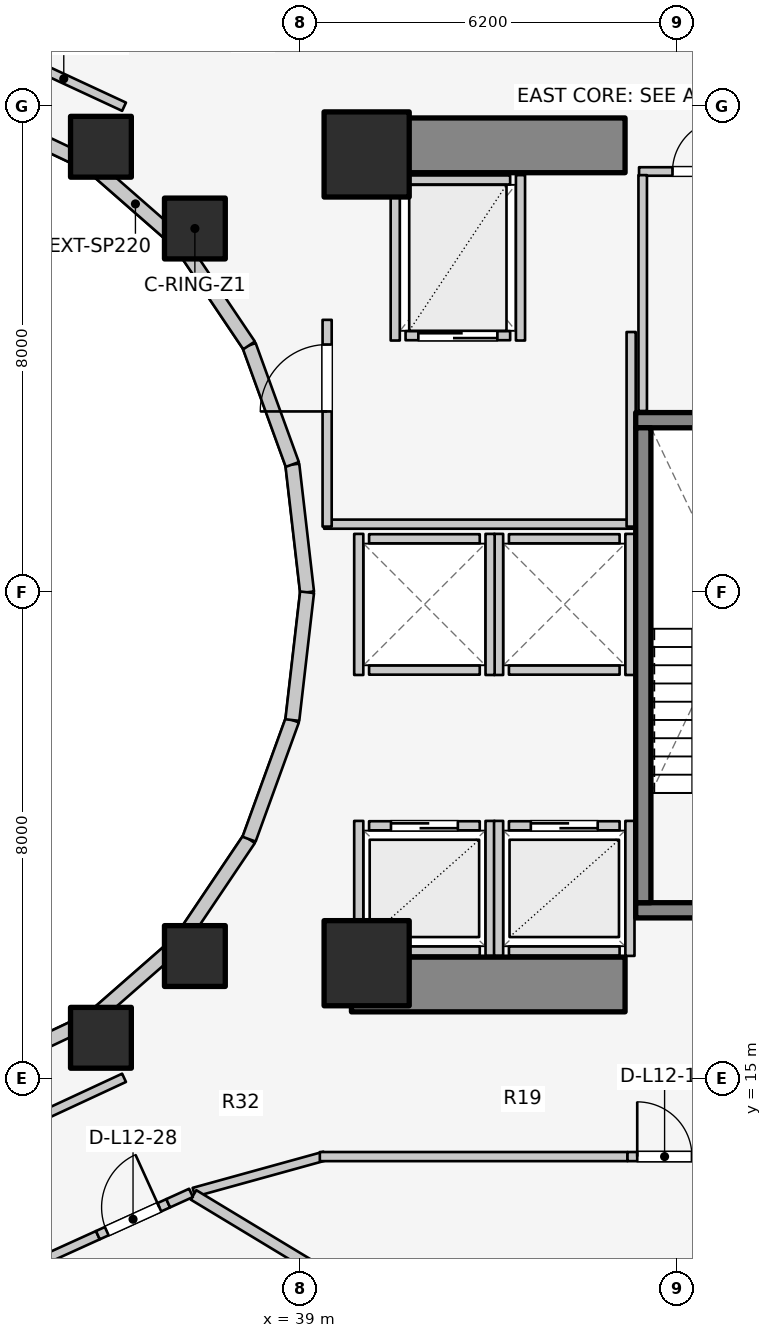
"""IFC4 building model, lengths in metres.
Left out: names, types, materials, properties, quantities, classifications, styles, units other than length and angle.
Written with IfcOpenShell. Run it as: python <this file> out.ifc"""

import sys

from ifc_helpers import new_model, si_unit, direction, frame, frame_2d, origin, origin_2d, place, context, subcontext, project, spatial, rectangle, extrude, element, fill, save


model = new_model("IFC4")
c1 = context("Model", 3, precision=1e-05, world=origin(), true_north=direction((0.0, 1.0)))
c2 = subcontext(c1, "Body", "Model", "MODEL_VIEW")
j1 = project(units=[si_unit("LENGTHUNIT", "METRE"), si_unit("PLANEANGLEUNIT", "RADIAN")], contexts=[c1])
p1 = place(None, origin())
s1 = spatial("IfcSite", under=j1, at=p1, CompositionType="ELEMENT")
p2 = place(p1, origin())
s2 = spatial("IfcBuilding", under=s1, at=p2, CompositionType="ELEMENT")
p3 = place(p2, frame((0.0, 0.0, 43.1)))
s3 = spatial("IfcBuildingStorey", under=s2, at=p3, CompositionType="ELEMENT", Elevation=43.1)
for number, where, z_axis, x_axis in (
    (1, (39.85, 16.55, 0.0), (0.0, 0.0, 1.0), (1.0, 0.0, 0.0)),
    (2, (39.85, 30.35, 0.0), (0.0, 0.0, 1.0), (1.0, 0.0, 0.0)),
):
    element("IfcWall", number, at=place(p3, frame(where, z_axis=z_axis, x_axis=x_axis)), inside=s3, PredefinedType="SHEAR", context=c2, shape_type="SweptSolid", body=[
        extrude(rectangle(XDim=4.5, YDim=0.9, at=frame_2d((2.25, 0.0))), origin(), (0.0, 0.0, 1.0), 3.1),
    ])
p4 = place(p3, frame((44.525, 17.77, 0.0), z_axis=(0.0, 0.0, 1.0), x_axis=(1.0, 0.0, 0.0)))
e3 = element("IfcWall", 3, at=p4, inside=s3, PredefinedType="SOLIDWALL", context=c2, shape_type="SweptSolid", body=[
    extrude(rectangle(XDim=3.37, YDim=0.25, at=frame_2d((1.685, 0.0))), origin(), (0.0, 0.0, 1.0), 3.1),
])
p5 = place(p4, frame((1.135, 0.0, 0.0)))
e4 = element("IfcOpeningElement", 4, at=p5, cuts=e3, PredefinedType="OPENING", context=c2, shape_type="SweptSolid", body=[
    extrude(rectangle(XDim=1.1, YDim=2.1, at=frame_2d((0.55, 1.05))), frame((0.0, 0.135, 0.0), z_axis=(0.0, -1.0, 0.0), x_axis=(1.0, 0.0, 0.0)), (0.0, 0.0, 1.0), 0.27),
])
p6 = place(p3, frame((44.525, 25.83, 0.0), z_axis=(0.0, 0.0, 1.0), x_axis=(1.0, 0.0, 0.0)))
e5 = element("IfcWall", 5, at=p6, inside=s3, PredefinedType="SOLIDWALL", context=c2, shape_type="SweptSolid", body=[
    extrude(rectangle(XDim=3.37, YDim=0.25, at=frame_2d((1.685, 0.0))), origin(), (0.0, 0.0, 1.0), 3.1),
])
p7 = place(p3, frame((44.65, 17.895, 0.0), z_axis=(0.0, 0.0, 1.0), x_axis=(0.0, 1.0, 0.0)))
e6 = element("IfcWall", 6, at=p7, inside=s3, PredefinedType="SOLIDWALL", context=c2, shape_type="SweptSolid", body=[
    extrude(rectangle(XDim=7.81, YDim=0.25, at=frame_2d((3.905, 0.0))), origin(), (0.0, 0.0, 1.0), 3.1),
])
for number, where, z_axis, x_axis in (
    (7, (40.1, 16.9, 0.0), (0.0, 0.0, 1.0), (1.0, 0.0, 0.0)),
    (8, (40.1, 30.2, 0.0), (0.0, 0.0, 1.0), (1.0, 0.0, 0.0)),
):
    element("IfcColumn", number, at=place(p3, frame(where, z_axis=z_axis, x_axis=x_axis)), inside=s3, PredefinedType="COLUMN", context=c2, shape_type="SweptSolid", body=[
        extrude(rectangle(XDim=1.4, YDim=1.4, at=origin_2d()), origin(), (0.0, 0.0, 1.0), 3.1),
    ])
for number, where, z_axis, x_axis in (
    (9, (37.275, 28.982, 0.0), (0.0, 0.0, 1.0), (1.0, 0.0, 0.0)),
    (10, (35.73, 30.327, 0.0), (0.0, 0.0, 1.0), (1.0, 0.0, 0.0)),
    (11, (35.73, 15.673, 0.0), (0.0, 0.0, 1.0), (1.0, 0.0, 0.0)),
    (12, (37.275, 17.018, 0.0), (0.0, 0.0, 1.0), (1.0, 0.0, 0.0)),
):
    element("IfcColumn", number, at=place(p3, frame(where, z_axis=z_axis, x_axis=x_axis)), inside=s3, PredefinedType="COLUMN", context=c2, shape_type="SweptSolid", body=[
        extrude(rectangle(XDim=1.0, YDim=1.0, at=origin_2d()), origin(), (0.0, 0.0, 1.0), 3.1),
    ])
p8 = place(p3, frame((39.12, 23.0, 0.0), z_axis=(0.0, 0.0, 1.0), x_axis=(-0.114711713601, 0.993398823617, 0.0)))
e13 = element("IfcWall", 13, at=p8, inside=s3, PredefinedType="STANDARD", context=c2, shape_type="SweptSolid", body=[
    extrude(rectangle(XDim=2.115, YDim=0.23, at=frame_2d((1.058, 0.0))), origin(), (0.0, 0.0, 1.0), 2.56),
])
p9 = place(p3, frame((38.877, 25.102, 0.0), z_axis=(0.0, 0.0, 1.0), x_axis=(-0.341423187295, 0.93990968033, 0.0)))
e14 = element("IfcWall", 14, at=p9, inside=s3, PredefinedType="STANDARD", context=c2, shape_type="SweptSolid", body=[
    extrude(rectangle(XDim=2.084, YDim=0.23, at=frame_2d((1.042, 0.0))), origin(), (0.0, 0.0, 1.0), 2.56),
])
p10 = place(p3, frame((38.166, 27.06, 0.0), z_axis=(0.0, 0.0, 1.0), x_axis=(-0.558197800898, 0.829707909492, 0.0)))
e15 = element("IfcWall", 15, at=p10, inside=s3, PredefinedType="STANDARD", context=c2, shape_type="SweptSolid", body=[
    extrude(rectangle(XDim=2.027, YDim=0.23, at=frame_2d((1.013, 0.0))), origin(), (0.0, 0.0, 1.0), 1.22),
])
p11 = place(p3, frame((37.035, 28.742, 0.0), z_axis=(0.0, 0.0, 1.0), x_axis=(-0.752576694707, 0.658504607869, 0.0)))
e16 = element("IfcWall", 16, at=p11, inside=s3, PredefinedType="STANDARD", context=c2, shape_type="SweptSolid", body=[
    extrude(rectangle(XDim=1.959, YDim=0.23, at=frame_2d((0.98, 0.0))), origin(), (0.0, 0.0, 1.0), 1.22),
])
for number, where, z_axis, x_axis in (
    (17, (35.56, 30.032, 0.0), (0.0, 0.0, 1.0), (-0.904, 0.427, 0.0)),
    (18, (33.843, 15.157, 0.0), (0.0, 0.0, 1.0), (0.904, 0.427, 0.0)),
):
    element("IfcWall", number, at=place(p3, frame(where, z_axis=z_axis, x_axis=x_axis)), inside=s3, PredefinedType="STANDARD", context=c2, shape_type="SweptSolid", body=[
        extrude(rectangle(XDim=1.899, YDim=0.23, at=frame_2d((0.95, 0.0))), origin(), (0.0, 0.0, 1.0), 1.22),
    ])
p12 = place(p3, frame((35.56, 15.968, 0.0), z_axis=(0.0, 0.0, 1.0), x_axis=(0.752576694707, 0.658504607869, 0.0)))
e19 = element("IfcWall", 19, at=p12, inside=s3, PredefinedType="STANDARD", context=c2, shape_type="SweptSolid", body=[
    extrude(rectangle(XDim=1.959, YDim=0.23, at=frame_2d((0.98, 0.0))), origin(), (0.0, 0.0, 1.0), 1.22),
])
p13 = place(p3, frame((37.035, 17.258, 0.0), z_axis=(0.0, 0.0, 1.0), x_axis=(0.558197800898, 0.829707909492, 0.0)))
e20 = element("IfcWall", 20, at=p13, inside=s3, PredefinedType="STANDARD", context=c2, shape_type="SweptSolid", body=[
    extrude(rectangle(XDim=2.027, YDim=0.23, at=frame_2d((1.013, 0.0))), origin(), (0.0, 0.0, 1.0), 1.22),
])
p14 = place(p3, frame((38.166, 18.94, 0.0), z_axis=(0.0, 0.0, 1.0), x_axis=(0.341423187295, 0.93990968033, 0.0)))
e21 = element("IfcWall", 21, at=p14, inside=s3, PredefinedType="STANDARD", context=c2, shape_type="SweptSolid", body=[
    extrude(rectangle(XDim=2.084, YDim=0.23, at=frame_2d((1.042, 0.0))), origin(), (0.0, 0.0, 1.0), 2.56),
])
p15 = place(p3, frame((38.877, 20.898, 0.0), z_axis=(0.0, 0.0, 1.0), x_axis=(0.114711713601, 0.993398823617, 0.0)))
e22 = element("IfcWall", 22, at=p15, inside=s3, PredefinedType="STANDARD", context=c2, shape_type="SweptSolid", body=[
    extrude(rectangle(XDim=2.115, YDim=0.23, at=frame_2d((1.058, 0.0))), origin(), (0.0, 0.0, 1.0), 2.56),
])
p16 = place(p3, frame((40.14, 19.16, 0.0), z_axis=(0.0, 0.0, 1.0), x_axis=(1.0, 0.0, 0.0)))
e23 = element("IfcWall", 23, at=p16, inside=s3, PredefinedType="SOLIDWALL", context=c2, shape_type="SweptSolid", body=[
    extrude(rectangle(XDim=1.82, YDim=0.15, at=frame_2d((0.91, 0.0))), origin(), (0.0, 0.0, 1.0), 2.12),
])
p17 = place(p16, frame((0.36, 0.0, 0.0)))
e24 = element("IfcOpeningElement", 24, at=p17, cuts=e23, PredefinedType="OPENING", context=c2, shape_type="SweptSolid", body=[
    extrude(rectangle(XDim=1.1, YDim=2.1, at=frame_2d((0.55, 1.05))), frame((0.0, 0.085, 0.0), z_axis=(0.0, -1.0, 0.0), x_axis=(1.0, 0.0, 0.0)), (0.0, 0.0, 1.0), 0.17),
])
p18 = place(p3, frame((40.14, 17.1, 0.0), z_axis=(0.0, 0.0, 1.0), x_axis=(1.0, 0.0, 0.0)))
e25 = element("IfcWall", 25, at=p18, inside=s3, PredefinedType="SOLIDWALL", context=c2, shape_type="SweptSolid", body=[
    extrude(rectangle(XDim=1.82, YDim=0.15, at=frame_2d((0.91, 0.0))), origin(), (0.0, 0.0, 1.0), 2.12),
])
p19 = place(p3, frame((39.97, 17.02, 0.0), z_axis=(0.0, 0.0, 1.0), x_axis=(0.0, 1.0, 0.0)))
e26 = element("IfcWall", 26, at=p19, inside=s3, PredefinedType="SOLIDWALL", context=c2, shape_type="SweptSolid", body=[
    extrude(rectangle(XDim=2.22, YDim=0.15, at=frame_2d((1.11, 0.0))), origin(), (0.0, 0.0, 1.0), 1.873),
])
p20 = place(p3, frame((42.13, 17.02, 0.0), z_axis=(0.0, 0.0, 1.0), x_axis=(0.0, 1.0, 0.0)))
e27 = element("IfcWall", 27, at=p20, inside=s3, PredefinedType="SOLIDWALL", context=c2, shape_type="SweptSolid", body=[
    extrude(rectangle(XDim=2.22, YDim=0.15, at=frame_2d((1.11, 0.0))), origin(), (0.0, 0.0, 1.0), 2.575),
])
p21 = place(p3, frame((42.44, 19.16, 0.0), z_axis=(0.0, 0.0, 1.0), x_axis=(1.0, 0.0, 0.0)))
e28 = element("IfcWall", 28, at=p21, inside=s3, PredefinedType="SOLIDWALL", context=c2, shape_type="SweptSolid", body=[
    extrude(rectangle(XDim=1.82, YDim=0.15, at=frame_2d((0.91, 0.0))), origin(), (0.0, 0.0, 1.0), 2.575),
])
p22 = place(p21, frame((0.36, 0.0, 0.0)))
e29 = element("IfcOpeningElement", 29, at=p22, cuts=e28, PredefinedType="OPENING", context=c2, shape_type="SweptSolid", body=[
    extrude(rectangle(XDim=1.1, YDim=2.1, at=frame_2d((0.55, 1.05))), frame((0.0, 0.085, 0.0), z_axis=(0.0, -1.0, 0.0), x_axis=(1.0, 0.0, 0.0)), (0.0, 0.0, 1.0), 0.17),
])
p23 = place(p3, frame((42.44, 17.1, 0.0), z_axis=(0.0, 0.0, 1.0), x_axis=(1.0, 0.0, 0.0)))
e30 = element("IfcWall", 30, at=p23, inside=s3, PredefinedType="SOLIDWALL", context=c2, shape_type="SweptSolid", body=[
    extrude(rectangle(XDim=1.82, YDim=0.15, at=frame_2d((0.91, 0.0))), origin(), (0.0, 0.0, 1.0), 2.575),
])
p24 = place(p3, frame((42.27, 17.02, 0.0), z_axis=(0.0, 0.0, 1.0), x_axis=(0.0, 1.0, 0.0)))
e31 = element("IfcWall", 31, at=p24, inside=s3, PredefinedType="SOLIDWALL", context=c2, shape_type="SweptSolid", body=[
    extrude(rectangle(XDim=2.22, YDim=0.15, at=frame_2d((1.11, 0.0))), origin(), (0.0, 0.0, 1.0), 2.575),
])
p25 = place(p3, frame((44.43, 17.02, 0.0), z_axis=(0.0, 0.0, 1.0), x_axis=(0.0, 1.0, 0.0)))
e32 = element("IfcWall", 32, at=p25, inside=s3, PredefinedType="SOLIDWALL", context=c2, shape_type="SweptSolid", body=[
    extrude(rectangle(XDim=2.22, YDim=0.15, at=frame_2d((1.11, 0.0))), origin(), (0.0, 0.0, 1.0), 2.12),
])
for number, where, z_axis, x_axis in (
    (33, (42.44, 21.72, 0.0), (0.0, 0.0, 1.0), (1.0, 0.0, 0.0)),
    (34, (42.44, 23.88, 0.0), (0.0, 0.0, 1.0), (1.0, 0.0, 0.0)),
):
    element("IfcWall", number, at=place(p3, frame(where, z_axis=z_axis, x_axis=x_axis)), inside=s3, PredefinedType="SOLIDWALL", context=c2, shape_type="SweptSolid", body=[
        extrude(rectangle(XDim=1.82, YDim=0.15, at=frame_2d((0.91, 0.0))), origin(), (0.0, 0.0, 1.0), 2.575),
    ])
for number, where, z_axis, x_axis in (
    (35, (42.27, 21.64, 0.0), (0.0, 0.0, 1.0), (0.0, 1.0, 0.0)),
    (36, (44.43, 21.64, 0.0), (0.0, 0.0, 1.0), (0.0, 1.0, 0.0)),
):
    element("IfcWall", number, at=place(p3, frame(where, z_axis=z_axis, x_axis=x_axis)), inside=s3, PredefinedType="SOLIDWALL", context=c2, shape_type="SweptSolid", body=[
        extrude(rectangle(XDim=2.32, YDim=0.15, at=frame_2d((1.16, 0.0))), origin(), (0.0, 0.0, 1.0), 2.575),
    ])
for number, where, z_axis, x_axis in (
    (37, (40.14, 21.72, 0.0), (0.0, 0.0, 1.0), (1.0, 0.0, 0.0)),
    (38, (40.14, 23.88, 0.0), (0.0, 0.0, 1.0), (1.0, 0.0, 0.0)),
):
    element("IfcWall", number, at=place(p3, frame(where, z_axis=z_axis, x_axis=x_axis)), inside=s3, PredefinedType="SOLIDWALL", context=c2, shape_type="SweptSolid", body=[
        extrude(rectangle(XDim=1.82, YDim=0.15, at=frame_2d((0.91, 0.0))), origin(), (0.0, 0.0, 1.0), 2.12),
    ])
p26 = place(p3, frame((39.97, 21.64, 0.0), z_axis=(0.0, 0.0, 1.0), x_axis=(0.0, 1.0, 0.0)))
e39 = element("IfcWall", 39, at=p26, inside=s3, PredefinedType="SOLIDWALL", context=c2, shape_type="SweptSolid", body=[
    extrude(rectangle(XDim=2.32, YDim=0.15, at=frame_2d((1.16, 0.0))), origin(), (0.0, 0.0, 1.0), 2.12),
])
p27 = place(p3, frame((42.13, 21.64, 0.0), z_axis=(0.0, 0.0, 1.0), x_axis=(0.0, 1.0, 0.0)))
e40 = element("IfcWall", 40, at=p27, inside=s3, PredefinedType="SOLIDWALL", context=c2, shape_type="SweptSolid", body=[
    extrude(rectangle(XDim=2.32, YDim=0.15, at=frame_2d((1.16, 0.0))), origin(), (0.0, 0.0, 1.0), 2.575),
])
p28 = place(p3, frame((40.74, 27.22, 0.0), z_axis=(0.0, 0.0, 1.0), x_axis=(1.0, 0.0, 0.0)))
e41 = element("IfcWall", 41, at=p28, inside=s3, PredefinedType="SOLIDWALL", context=c2, shape_type="SweptSolid", body=[
    extrude(rectangle(XDim=1.72, YDim=0.15, at=frame_2d((0.86, 0.0))), origin(), (0.0, 0.0, 1.0), 2.575),
])
p29 = place(p28, frame((0.21, 0.0, 0.0)))
e42 = element("IfcOpeningElement", 42, at=p29, cuts=e41, PredefinedType="OPENING", context=c2, shape_type="SweptSolid", body=[
    extrude(rectangle(XDim=1.3, YDim=2.1, at=frame_2d((0.65, 1.05))), frame((0.0, 0.085, 0.0), z_axis=(0.0, -1.0, 0.0), x_axis=(1.0, 0.0, 0.0)), (0.0, 0.0, 1.0), 0.17),
])
p30 = place(p3, frame((40.74, 29.78, 0.0), z_axis=(0.0, 0.0, 1.0), x_axis=(1.0, 0.0, 0.0)))
e43 = element("IfcWall", 43, at=p30, inside=s3, PredefinedType="SOLIDWALL", context=c2, shape_type="SweptSolid", body=[
    extrude(rectangle(XDim=1.72, YDim=0.15, at=frame_2d((0.86, 0.0))), origin(), (0.0, 0.0, 1.0), 2.575),
])
for number, where, z_axis, x_axis in (
    (44, (40.57, 27.14, 0.0), (0.0, 0.0, 1.0), (0.0, 1.0, 0.0)),
    (45, (42.63, 27.14, 0.0), (0.0, 0.0, 1.0), (0.0, 1.0, 0.0)),
):
    element("IfcWall", number, at=place(p3, frame(where, z_axis=z_axis, x_axis=x_axis)), inside=s3, PredefinedType="SOLIDWALL", context=c2, shape_type="SweptSolid", body=[
        extrude(rectangle(XDim=2.72, YDim=0.15, at=frame_2d((1.36, 0.0))), origin(), (0.0, 0.0, 1.0), 2.575),
    ])
p31 = place(p3, frame((39.4, 24.12, 0.0), z_axis=(0.0, 0.0, 1.0), x_axis=(1.0, 0.0, 0.0)))
e46 = element("IfcWall", 46, at=p31, inside=s3, PredefinedType="PARTITIONING", context=c2, shape_type="SweptSolid", body=[
    extrude(rectangle(XDim=5.08, YDim=0.15, at=frame_2d((2.54, 0.0))), origin(), (0.0, 0.0, 1.0), 2.12),
])
p32 = place(p3, frame((44.45, 24.08, 0.0), z_axis=(0.0, 0.0, 1.0), x_axis=(0.0, 1.0, 0.0)))
e47 = element("IfcWall", 47, at=p32, inside=s3, PredefinedType="PARTITIONING", context=c2, shape_type="SweptSolid", body=[
    extrude(rectangle(XDim=3.2, YDim=0.15, at=frame_2d((1.6, 0.0))), origin(), (0.0, 0.0, 1.0), 2.575),
])
p33 = place(p3, frame((39.45, 24.08, 0.0), z_axis=(0.0, 0.0, 1.0), x_axis=(0.0, 1.0, 0.0)))
e48 = element("IfcWall", 48, at=p33, inside=s3, PredefinedType="PARTITIONING", context=c2, shape_type="SweptSolid", body=[
    extrude(rectangle(XDim=3.4, YDim=0.15, at=frame_2d((1.7, 0.0))), origin(), (0.0, 0.0, 1.0), 2.575),
])
p34 = place(p33, frame((1.894, 0.0, 0.0)))
e49 = element("IfcOpeningElement", 49, at=p34, cuts=e48, PredefinedType="OPENING", context=c2, shape_type="SweptSolid", body=[
    extrude(rectangle(XDim=1.1, YDim=2.1, at=frame_2d((0.55, 1.05))), frame((0.0, 0.085, 0.0), z_axis=(0.0, -1.0, 0.0), x_axis=(1.0, 0.0, 0.0)), (0.0, 0.0, 1.0), 0.17),
])
p35 = place(p3, frame((44.58, 29.92, 0.0), z_axis=(0.0, 0.0, 1.0), x_axis=(1.0, 0.0, 0.0)))
e50 = element("IfcWall", 50, at=p35, inside=s3, PredefinedType="PLUMBINGWALL", context=c2, shape_type="SweptSolid", body=[
    extrude(rectangle(XDim=2.0, YDim=0.14, at=frame_2d((1.0, 0.0))), origin(), (0.0, 0.0, 1.0), 2.575),
])
p36 = place(p35, frame((0.55, 0.0, 0.0)))
e51 = element("IfcOpeningElement", 51, at=p36, cuts=e50, PredefinedType="OPENING", context=c2, shape_type="SweptSolid", body=[
    extrude(rectangle(XDim=0.85, YDim=2.05, at=frame_2d((0.425, 1.025))), frame((0.0, 0.08, 0.0), z_axis=(0.0, -1.0, 0.0), x_axis=(1.0, 0.0, 0.0)), (0.0, 0.0, 1.0), 0.16),
])
p37 = place(p3, frame((44.64, 25.98, 0.0), z_axis=(0.0, 0.0, 1.0), x_axis=(0.0, 1.0, 0.0)))
e52 = element("IfcWall", 52, at=p37, inside=s3, PredefinedType="PLUMBINGWALL", context=c2, shape_type="SweptSolid", body=[
    extrude(rectangle(XDim=3.88, YDim=0.14, at=frame_2d((1.94, 0.0))), origin(), (0.0, 0.0, 1.0), 2.575),
])
p38 = place(p3, frame((36.11, 30.985, 0.0), z_axis=(0.0, 0.0, 1.0), x_axis=(-0.906943449489, 0.421252393975, 0.0)))
e53 = element("IfcWall", 53, at=p38, inside=s3, PredefinedType="PARTITIONING", context=c2, shape_type="SweptSolid", body=[
    extrude(rectangle(XDim=2.186, YDim=0.15, at=frame_2d((1.093, 0.0))), origin(), (0.0, 0.0, 1.0), 1.22),
])
p39 = place(p3, frame((34.127, 14.094, 0.0), z_axis=(0.0, 0.0, 1.0), x_axis=(0.906943449489, 0.421252393975, 0.0)))
e54 = element("IfcWall", 54, at=p39, inside=s3, PredefinedType="PARTITIONING", context=c2, shape_type="SweptSolid", body=[
    extrude(rectangle(XDim=2.186, YDim=0.15, at=frame_2d((1.093, 0.0))), origin(), (0.0, 0.0, 1.0), 1.957),
])
p40 = place(p3, frame((37.258, 13.133, 0.0), z_axis=(0.0, 0.0, 1.0), x_axis=(0.963833843713, 0.266503886865, 0.0)))
e55 = element("IfcWall", 55, at=p40, inside=s3, PredefinedType="PARTITIONING", context=c2, shape_type="SweptSolid", body=[
    extrude(rectangle(XDim=2.232, YDim=0.15, at=frame_2d((1.116, 0.0))), origin(), (0.0, 0.0, 1.0), 1.957),
])
p41 = place(p3, frame((39.33, 13.72, 0.0), z_axis=(0.0, 0.0, 1.0), x_axis=(1.0, 0.0, 0.0)))
e56 = element("IfcWall", 56, at=p41, inside=s3, PredefinedType="PARTITIONING", context=c2, shape_type="SweptSolid", body=[
    extrude(rectangle(XDim=5.06, YDim=0.15, at=frame_2d((2.53, 0.0))), origin(), (0.0, 0.0, 1.0), 1.957),
])
p42 = place(p3, frame((44.39, 13.72, 0.0), z_axis=(0.0, 0.0, 1.0), x_axis=(1.0, 0.0, 0.0)))
e57 = element("IfcWall", 57, at=p42, inside=s3, PredefinedType="PARTITIONING", context=c2, shape_type="SweptSolid", body=[
    extrude(rectangle(XDim=1.22, YDim=0.15, at=frame_2d((0.61, 0.0))), origin(), (0.0, 0.0, 1.0), 2.575),
])
p43 = place(p42, frame((0.16, 0.0, 0.0)))
e58 = element("IfcOpeningElement", 58, at=p43, cuts=e57, PredefinedType="OPENING", context=c2, shape_type="SweptSolid", body=[
    extrude(rectangle(XDim=0.9, YDim=2.1, at=frame_2d((0.45, 1.05))), frame((0.0, 0.085, 0.0), z_axis=(0.0, -1.0, 0.0), x_axis=(1.0, 0.0, 0.0)), (0.0, 0.0, 1.0), 0.17),
])
p44 = place(p3, frame((37.252, 13.09, 0.0), z_axis=(0.0, 0.0, 1.0), x_axis=(0.855817136021, -0.517278483694, 0.0)))
e59 = element("IfcWall", 59, at=p44, inside=s3, PredefinedType="PARTITIONING", context=c2, shape_type="SweptSolid", body=[
    extrude(rectangle(XDim=9.564, YDim=0.18, at=frame_2d((4.782, 0.0))), origin(), (0.0, 0.0, 1.0), 1.957),
])
p45 = place(p3, frame((34.687, 11.977, 0.0), z_axis=(0.0, 0.0, 1.0), x_axis=(0.910596482868, 0.413296558645, 0.0)))
e60 = element("IfcWall", 60, at=p45, inside=s3, PredefinedType="PARTITIONING", context=c2, shape_type="SweptSolid", body=[
    extrude(rectangle(XDim=1.09, YDim=0.15, at=frame_2d((0.545, 0.0))), origin(), (0.0, 0.0, 1.0), 1.957),
])
p46 = place(p3, frame((35.68, 12.427, 0.0), z_axis=(0.0, 0.0, 1.0), x_axis=(0.910524396382, 0.413455346552, 0.0)))
e61 = element("IfcWall", 61, at=p46, inside=s3, PredefinedType="PARTITIONING", context=c2, shape_type="SweptSolid", body=[
    extrude(rectangle(XDim=1.27, YDim=0.15, at=frame_2d((0.635, 0.0))), origin(), (0.0, 0.0, 1.0), 2.16),
])
p47 = place(p46, frame((0.16, 0.0, 0.0)))
e62 = element("IfcOpeningElement", 62, at=p47, cuts=e61, PredefinedType="OPENING", context=c2, shape_type="SweptSolid", body=[
    extrude(rectangle(XDim=0.95, YDim=2.1, at=frame_2d((0.475, 1.05))), frame((0.0, 0.085, 0.0), z_axis=(0.0, -1.0, 0.0), x_axis=(1.0, 0.0, 0.0)), (0.0, 0.0, 1.0), 0.17),
])
p48 = place(p3, frame((36.836, 12.952, 0.0), z_axis=(0.0, 0.0, 1.0), x_axis=(0.910630236002, 0.413222183915, 0.0)))
e63 = element("IfcWall", 63, at=p48, inside=s3, PredefinedType="PARTITIONING", context=c2, shape_type="SweptSolid", body=[
    extrude(rectangle(XDim=0.412, YDim=0.15, at=frame_2d((0.206, 0.0))), origin(), (0.0, 0.0, 1.0), 2.575),
])
p49 = place(p17, origin())
e64 = element("IfcDoor", 64, at=p49, inside=s3, OperationType="DOUBLE_DOOR_SLIDING", PredefinedType="DOOR", context=c2, shape_type="SweptSolid", body=[
    extrude(rectangle(XDim=1.1, YDim=2.1, at=frame_2d((0.55, 1.05))), frame((0.0, 0.025, 0.0), z_axis=(0.0, -1.0, 0.0), x_axis=(1.0, 0.0, 0.0)), (0.0, 0.0, 1.0), 0.05),
])
fill(e24, e64)
p50 = place(p22, origin())
e65 = element("IfcDoor", 65, at=p50, inside=s3, OperationType="DOUBLE_DOOR_SLIDING", PredefinedType="DOOR", context=c2, shape_type="SweptSolid", body=[
    extrude(rectangle(XDim=1.1, YDim=2.1, at=frame_2d((0.55, 1.05))), frame((0.0, 0.025, 0.0), z_axis=(0.0, -1.0, 0.0), x_axis=(1.0, 0.0, 0.0)), (0.0, 0.0, 1.0), 0.05),
])
fill(e29, e65)
p51 = place(p29, origin())
e66 = element("IfcDoor", 66, at=p51, inside=s3, OperationType="DOUBLE_DOOR_SLIDING", PredefinedType="DOOR", context=c2, shape_type="SweptSolid", body=[
    extrude(rectangle(XDim=1.3, YDim=2.1, at=frame_2d((0.65, 1.05))), frame((0.0, 0.025, 0.0), z_axis=(0.0, -1.0, 0.0), x_axis=(1.0, 0.0, 0.0)), (0.0, 0.0, 1.0), 0.05),
])
fill(e42, e66)
p52 = place(p34, origin())
e67 = element("IfcDoor", 67, at=p52, inside=s3, OperationType="SINGLE_SWING_LEFT", PredefinedType="DOOR", context=c2, shape_type="SweptSolid", body=[
    extrude(rectangle(XDim=1.1, YDim=2.1, at=frame_2d((0.55, 1.05))), frame((0.0, 0.025, 0.0), z_axis=(0.0, -1.0, 0.0), x_axis=(1.0, 0.0, 0.0)), (0.0, 0.0, 1.0), 0.05),
])
fill(e49, e67)
p53 = place(p36, origin())
e68 = element("IfcDoor", 68, at=p53, inside=s3, OperationType="SINGLE_SWING_RIGHT", PredefinedType="DOOR", context=c2, shape_type="SweptSolid", body=[
    extrude(rectangle(XDim=0.85, YDim=2.05, at=frame_2d((0.425, 1.025))), frame((0.0, 0.025, 0.0), z_axis=(0.0, -1.0, 0.0), x_axis=(1.0, 0.0, 0.0)), (0.0, 0.0, 1.0), 0.05),
])
fill(e51, e68)
p54 = place(p43, origin())
e69 = element("IfcDoor", 69, at=p54, inside=s3, OperationType="SINGLE_SWING_LEFT", PredefinedType="DOOR", context=c2, shape_type="SweptSolid", body=[
    extrude(rectangle(XDim=0.9, YDim=2.1, at=frame_2d((0.45, 1.05))), frame((0.0, 0.025, 0.0), z_axis=(0.0, -1.0, 0.0), x_axis=(1.0, 0.0, 0.0)), (0.0, 0.0, 1.0), 0.05),
])
fill(e58, e69)
p55 = place(p47, origin())
e70 = element("IfcDoor", 70, at=p55, inside=s3, OperationType="SINGLE_SWING_RIGHT", PredefinedType="DOOR", context=c2, shape_type="SweptSolid", body=[
    extrude(rectangle(XDim=0.95, YDim=2.1, at=frame_2d((0.475, 1.05))), frame((0.0, 0.025, 0.0), z_axis=(0.0, -1.0, 0.0), x_axis=(1.0, 0.0, 0.0)), (0.0, 0.0, 1.0), 0.05),
])
fill(e62, e70)
save(model, sys.argv[1])
